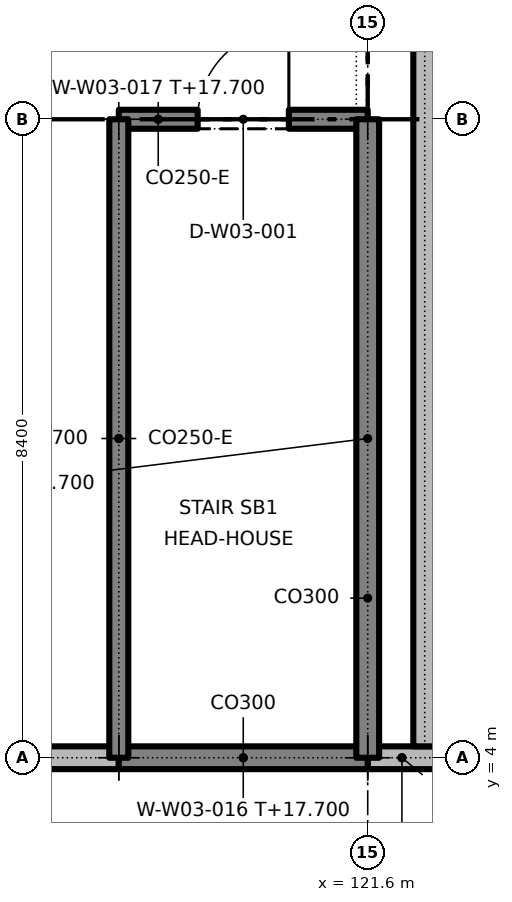
"""IFC4 building model, lengths in metres.
Left out: names, types, materials, properties, quantities, classifications, styles, units other than length and angle.
Written with IfcOpenShell. Run it as: python <this file> out.ifc"""

import sys

from ifc_helpers import new_model, si_unit, direction, frame, frame_2d, origin, place, context, subcontext, project, spatial, rectangle, extrude, element, fill, save


model = new_model("IFC4")
c1 = context("Model", 3, precision=1e-05, world=origin(), true_north=direction((0.0, 1.0)))
c2 = subcontext(c1, "Body", "Model", "MODEL_VIEW")
j1 = project(units=[si_unit("LENGTHUNIT", "METRE"), si_unit("PLANEANGLEUNIT", "RADIAN")], contexts=[c1])
p1 = place(None, origin())
s1 = spatial("IfcSite", under=j1, at=p1, CompositionType="ELEMENT")
p2 = place(p1, origin())
s2 = spatial("IfcBuilding", under=s1, at=p2, CompositionType="ELEMENT")
p3 = place(p2, frame((0.0, 0.0, 15.0)))
s3 = spatial("IfcBuildingStorey", under=s2, at=p3, CompositionType="ELEMENT", Elevation=15.0)
p4 = place(p3, frame((96.4, 4.0, 0.0), z_axis=(0.0, 0.0, 1.0), x_axis=(1.0, 0.0, 0.0)))
e1 = element("IfcWall", 1, at=p4, inside=s3, PredefinedType="PARAPET", context=c2, shape_type="SweptSolid", body=[
    extrude(rectangle(XDim=21.925, YDim=0.3, at=frame_2d((10.962, 0.0))), origin(), (0.0, 0.0, 1.0), 1.1),
])
p5 = place(p3, frame((121.6, 4.0, 0.17), z_axis=(0.0, 0.0, 1.0), x_axis=(1.0, 0.0, 0.0)))
e2 = element("IfcWall", 2, at=p5, inside=s3, PredefinedType="PARAPET", context=c2, shape_type="SweptSolid", body=[
    extrude(rectangle(XDim=0.9, YDim=0.3, at=frame_2d((0.45, 0.0))), origin(), (0.0, 0.0, 1.0), 1.1),
])
p6 = place(p3, frame((122.35, 4.15, 0.17), z_axis=(0.0, 0.0, 1.0), x_axis=(0.0, 1.0, 0.0)))
e3 = element("IfcWall", 3, at=p6, inside=s3, PredefinedType="PARAPET", context=c2, shape_type="SweptSolid", body=[
    extrude(rectangle(XDim=92.1, YDim=0.3, at=frame_2d((46.05, 0.0))), origin(), (0.0, 0.0, 1.0), 1.1),
])
p7 = place(p3, frame((118.325, 4.0, 0.0), z_axis=(0.0, 0.0, 1.0), x_axis=(1.0, 0.0, 0.0)))
e4 = element("IfcWall", 4, at=p7, inside=s3, PredefinedType="SHEAR", context=c2, shape_type="SweptSolid", body=[
    extrude(rectangle(XDim=3.275, YDim=0.3, at=frame_2d((1.638, 0.0))), origin(), (0.0, 0.0, 1.0), 2.7),
])
p8 = place(p3, frame((118.325, 12.4, 0.0), z_axis=(0.0, 0.0, 1.0), x_axis=(1.0, 0.0, 0.0)))
e5 = element("IfcWall", 5, at=p8, inside=s3, PredefinedType="SHEAR", context=c2, shape_type="SweptSolid", body=[
    extrude(rectangle(XDim=3.275, YDim=0.25, at=frame_2d((1.638, 0.0))), origin(), (0.0, 0.0, 1.0), 2.7),
])
p9 = place(p8, frame((1.038, 0.0, 0.0)))
e6 = element("IfcOpeningElement", 6, at=p9, cuts=e5, PredefinedType="OPENING", context=c2, shape_type="SweptSolid", body=[
    extrude(rectangle(XDim=1.2, YDim=2.1, at=frame_2d((0.6, 1.05))), frame((0.0, 0.135, 0.0), z_axis=(0.0, -1.0, 0.0), x_axis=(1.0, 0.0, 0.0)), (0.0, 0.0, 1.0), 0.27),
])
p10 = place(p3, frame((118.325, 4.0, 0.0), z_axis=(0.0, 0.0, 1.0), x_axis=(0.0, 1.0, 0.0)))
e7 = element("IfcWall", 7, at=p10, inside=s3, PredefinedType="SHEAR", context=c2, shape_type="SweptSolid", body=[
    extrude(rectangle(XDim=8.4, YDim=0.25, at=frame_2d((4.2, 0.0))), origin(), (0.0, 0.0, 1.0), 2.7),
])
p11 = place(p3, frame((121.6, 4.0, 0.0), z_axis=(0.0, 0.0, 1.0), x_axis=(0.0, 1.0, 0.0)))
e8 = element("IfcWall", 8, at=p11, inside=s3, PredefinedType="SHEAR", context=c2, shape_type="SweptSolid", body=[
    extrude(rectangle(XDim=8.4, YDim=0.3, at=frame_2d((4.2, 0.0))), origin(), (0.0, 0.0, 1.0), 2.7),
])
p12 = place(p9, origin())
e9 = element("IfcDoor", 9, at=p12, inside=s3, OperationType="SINGLE_SWING_RIGHT", PredefinedType="DOOR", context=c2, shape_type="SweptSolid", body=[
    extrude(rectangle(XDim=1.2, YDim=2.1, at=frame_2d((0.6, 1.05))), frame((0.0, 0.025, 0.0), z_axis=(0.0, -1.0, 0.0), x_axis=(1.0, 0.0, 0.0)), (0.0, 0.0, 1.0), 0.05),
])
fill(e6, e9)
save(model, sys.argv[1])
